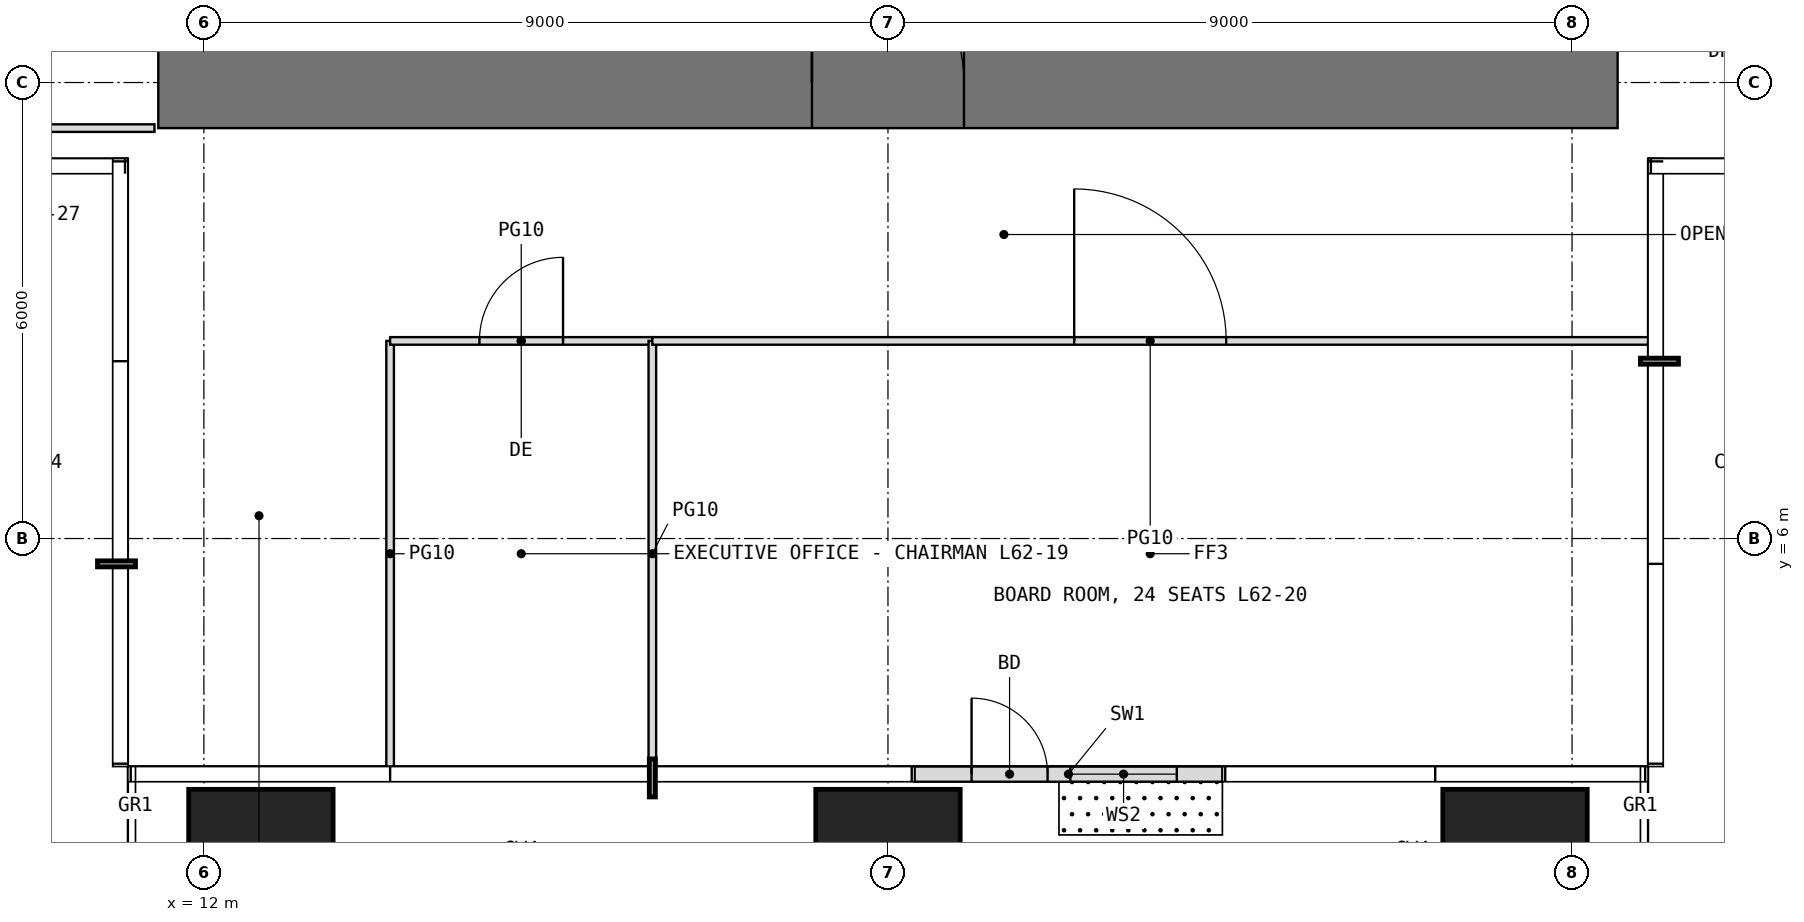
"""IFC4 building model, lengths in metres.
Left out: names, types, materials, properties, quantities, classifications, styles, units other than length and angle.
Written with IfcOpenShell. Run it as: python <this file> out.ifc"""

import sys

from ifc_helpers import new_model, si_unit, direction, frame, frame_2d, origin, origin_2d, place, context, subcontext, project, spatial, rectangle, extrude, element, fill, save


model = new_model("IFC4")
c1 = context("Model", 3, precision=1e-05, world=origin(), true_north=direction((0.0, 1.0)))
c2 = subcontext(c1, "Body", "Model", "MODEL_VIEW")
j1 = project(units=[si_unit("LENGTHUNIT", "METRE"), si_unit("PLANEANGLEUNIT", "RADIAN")], contexts=[c1])
p1 = place(None, origin())
s1 = spatial("IfcSite", under=j1, at=p1, CompositionType="ELEMENT")
p2 = place(p1, origin())
s2 = spatial("IfcBuilding", under=s1, at=p2, CompositionType="ELEMENT")
p3 = place(p2, frame((0.0, 0.0, 260.8)))
s3 = spatial("IfcBuildingStorey", under=s2, at=p3, CompositionType="ELEMENT", Elevation=260.8)
for number, where, z_axis, x_axis in (
    (1, (12.75, 1.75, 0.0), (0.0, 0.0, 1.0), (1.0, 0.0, 0.0)),
    (2, (21.0, 1.75, 0.0), (0.0, 0.0, 1.0), (1.0, 0.0, 0.0)),
    (3, (29.25, 1.75, 0.0), (0.0, 0.0, 1.0), (1.0, 0.0, 0.0)),
):
    element("IfcColumn", number, at=place(p3, frame(where, z_axis=z_axis, x_axis=x_axis)), inside=s3, PredefinedType="COLUMN", context=c2, shape_type="SweptSolid", body=[
        extrude(rectangle(XDim=1.9, YDim=1.9, at=origin_2d()), origin(), (0.0, 0.0, 1.0), 4.2),
    ])
p4 = place(p3, frame((21.35, 2.9, 0.0), z_axis=(0.0, 0.0, 1.0), x_axis=(1.0, 0.0, 0.0)))
e4 = element("IfcWall", 4, at=p4, inside=s3, PredefinedType="USERDEFINED", context=c2, shape_type="SweptSolid", body=[
    extrude(rectangle(XDim=4.05, YDim=0.2, at=frame_2d((2.025, 0.0))), origin(), (0.0, 0.0, 1.0), 3.95),
])
p5 = place(p4, frame((0.75, 0.0, 0.0)))
e5 = element("IfcOpeningElement", 5, at=p5, cuts=e4, PredefinedType="OPENING", context=c2, shape_type="SweptSolid", body=[
    extrude(rectangle(XDim=1.0, YDim=2.4, at=frame_2d((0.5, 1.2))), frame((0.0, 0.11, 0.0), z_axis=(0.0, -1.0, 0.0), x_axis=(1.0, 0.0, 0.0)), (0.0, 0.0, 1.0), 0.22),
])
p6 = place(p4, frame((2.05, 0.0, 0.3)))
e6 = element("IfcOpeningElement", 6, at=p6, cuts=e4, PredefinedType="OPENING", context=c2, shape_type="SweptSolid", body=[
    extrude(rectangle(XDim=1.4, YDim=2.7, at=frame_2d((0.7, 1.35))), frame((0.0, 0.11, 0.0), z_axis=(0.0, -1.0, 0.0), x_axis=(1.0, 0.0, 0.0)), (0.0, 0.0, 1.0), 0.22),
])
p7 = place(p3, frame((11.4, 12.0, -0.05), z_axis=(0.0, 0.0, 1.0), x_axis=(1.0, 0.0, 0.0)))
e7 = element("IfcWall", 7, at=p7, inside=s3, PredefinedType="SHEAR", context=c2, shape_type="SweptSolid", body=[
    extrude(rectangle(XDim=19.2, YDim=1.2, at=frame_2d((9.6, 0.0))), origin(), (0.0, 0.0, 1.0), 4.2),
])
p8 = place(p7, frame((8.6, 0.0, 0.05)))
e8 = element("IfcOpeningElement", 8, at=p8, cuts=e7, PredefinedType="OPENING", context=c2, shape_type="SweptSolid", body=[
    extrude(rectangle(XDim=2.0, YDim=2.2, at=frame_2d((1.0, 1.1))), frame((0.0, 0.61, 0.0), z_axis=(0.0, -1.0, 0.0), x_axis=(1.0, 0.0, 0.0)), (0.0, 0.0, 1.0), 1.22),
])
p9 = place(p3, frame((8.0, 11.4, 0.0), z_axis=(0.0, 0.0, 1.0), x_axis=(1.0, 0.0, 0.0)))
e9 = element("IfcWall", 9, at=p9, inside=s3, PredefinedType="PARTITIONING", context=c2, shape_type="SweptSolid", body=[
    extrude(rectangle(XDim=3.35, YDim=0.1, at=frame_2d((1.675, 0.0))), origin(), (0.0, 0.0, 1.0), 3.95),
])
p10 = place(p3, frame((14.45, 3.0, 0.0), z_axis=(0.0, 0.0, 1.0), x_axis=(0.0, 1.0, 0.0)))
e10 = element("IfcWall", 10, at=p10, inside=s3, PredefinedType="PARTITIONING", context=c2, shape_type="SweptSolid", body=[
    extrude(rectangle(XDim=5.6, YDim=0.1, at=frame_2d((2.8, 0.0))), origin(), (0.0, 0.0, 1.0), 3.95),
])
p11 = place(p3, frame((14.45, 8.6, 0.0), z_axis=(0.0, 0.0, 1.0), x_axis=(1.0, 0.0, 0.0)))
e11 = element("IfcWall", 11, at=p11, inside=s3, PredefinedType="PARTITIONING", context=c2, shape_type="SweptSolid", body=[
    extrude(rectangle(XDim=3.45, YDim=0.1, at=frame_2d((1.725, 0.0))), origin(), (0.0, 0.0, 1.0), 3.95),
])
p12 = place(p11, frame((1.175, 0.0, 0.0)))
e12 = element("IfcOpeningElement", 12, at=p12, cuts=e11, PredefinedType="OPENING", context=c2, shape_type="SweptSolid", body=[
    extrude(rectangle(XDim=1.1, YDim=2.3, at=frame_2d((0.55, 1.15))), frame((0.0, 0.06, 0.0), z_axis=(0.0, -1.0, 0.0), x_axis=(1.0, 0.0, 0.0)), (0.0, 0.0, 1.0), 0.12),
])
p13 = place(p3, frame((17.9, 3.0, 0.0), z_axis=(0.0, 0.0, 1.0), x_axis=(0.0, 1.0, 0.0)))
e13 = element("IfcWall", 13, at=p13, inside=s3, PredefinedType="PARTITIONING", context=c2, shape_type="SweptSolid", body=[
    extrude(rectangle(XDim=5.6, YDim=0.1, at=frame_2d((2.8, 0.0))), origin(), (0.0, 0.0, 1.0), 3.95),
])
p14 = place(p3, frame((17.9, 8.6, 0.0), z_axis=(0.0, 0.0, 1.0), x_axis=(1.0, 0.0, 0.0)))
e14 = element("IfcWall", 14, at=p14, inside=s3, PredefinedType="PARTITIONING", context=c2, shape_type="SweptSolid", body=[
    extrude(rectangle(XDim=13.1, YDim=0.1, at=frame_2d((6.55, 0.0))), origin(), (0.0, 0.0, 1.0), 3.95),
])
p15 = place(p14, frame((5.55, 0.0, 0.0)))
e15 = element("IfcOpeningElement", 15, at=p15, cuts=e14, PredefinedType="OPENING", context=c2, shape_type="SweptSolid", body=[
    extrude(rectangle(XDim=2.0, YDim=2.4, at=frame_2d((1.0, 1.2))), frame((0.0, 0.06, 0.0), z_axis=(0.0, -1.0, 0.0), x_axis=(1.0, 0.0, 0.0)), (0.0, 0.0, 1.0), 0.12),
])
p16 = place(p5, origin())
e16 = element("IfcDoor", 16, at=p16, inside=s3, OperationType="SINGLE_SWING_LEFT", PredefinedType="DOOR", context=c2, shape_type="SweptSolid", body=[
    extrude(rectangle(XDim=1.0, YDim=2.4, at=frame_2d((0.5, 1.2))), frame((0.0, 0.025, 0.0), z_axis=(0.0, -1.0, 0.0), x_axis=(1.0, 0.0, 0.0)), (0.0, 0.0, 1.0), 0.05),
])
fill(e5, e16)
p17 = place(p6, origin())
e17 = element("IfcWindow", 17, at=p17, inside=s3, PartitioningType="SINGLE_PANEL", PredefinedType="WINDOW", context=c2, shape_type="SweptSolid", body=[
    extrude(rectangle(XDim=1.4, YDim=2.7, at=frame_2d((0.7, 1.35))), frame((0.0, 0.03, 0.0), z_axis=(0.0, -1.0, 0.0), x_axis=(1.0, 0.0, 0.0)), (0.0, 0.0, 1.0), 0.06),
])
fill(e6, e17)
p18 = place(p8, origin())
e18 = element("IfcDoor", 18, at=p18, inside=s3, OperationType="DOUBLE_DOOR_SINGLE_SWING", PredefinedType="DOOR", context=c2, shape_type="SweptSolid", body=[
    extrude(rectangle(XDim=2.0, YDim=2.2, at=frame_2d((1.0, 1.1))), frame((0.0, 0.025, 0.0), z_axis=(0.0, -1.0, 0.0), x_axis=(1.0, 0.0, 0.0)), (0.0, 0.0, 1.0), 0.05),
])
fill(e8, e18)
p19 = place(p12, origin())
e19 = element("IfcDoor", 19, at=p19, inside=s3, OperationType="SINGLE_SWING_RIGHT", PredefinedType="DOOR", context=c2, shape_type="SweptSolid", body=[
    extrude(rectangle(XDim=1.1, YDim=2.3, at=frame_2d((0.55, 1.15))), frame((0.0, 0.025, 0.0), z_axis=(0.0, -1.0, 0.0), x_axis=(1.0, 0.0, 0.0)), (0.0, 0.0, 1.0), 0.05),
])
fill(e12, e19)
p20 = place(p15, origin())
e20 = element("IfcDoor", 20, at=p20, inside=s3, OperationType="DOUBLE_DOOR_SINGLE_SWING", PredefinedType="DOOR", context=c2, shape_type="SweptSolid", body=[
    extrude(rectangle(XDim=2.0, YDim=2.4, at=frame_2d((1.0, 1.2))), frame((0.0, 0.025, 0.0), z_axis=(0.0, -1.0, 0.0), x_axis=(1.0, 0.0, 0.0)), (0.0, 0.0, 1.0), 0.05),
])
fill(e15, e20)
save(model, sys.argv[1])
